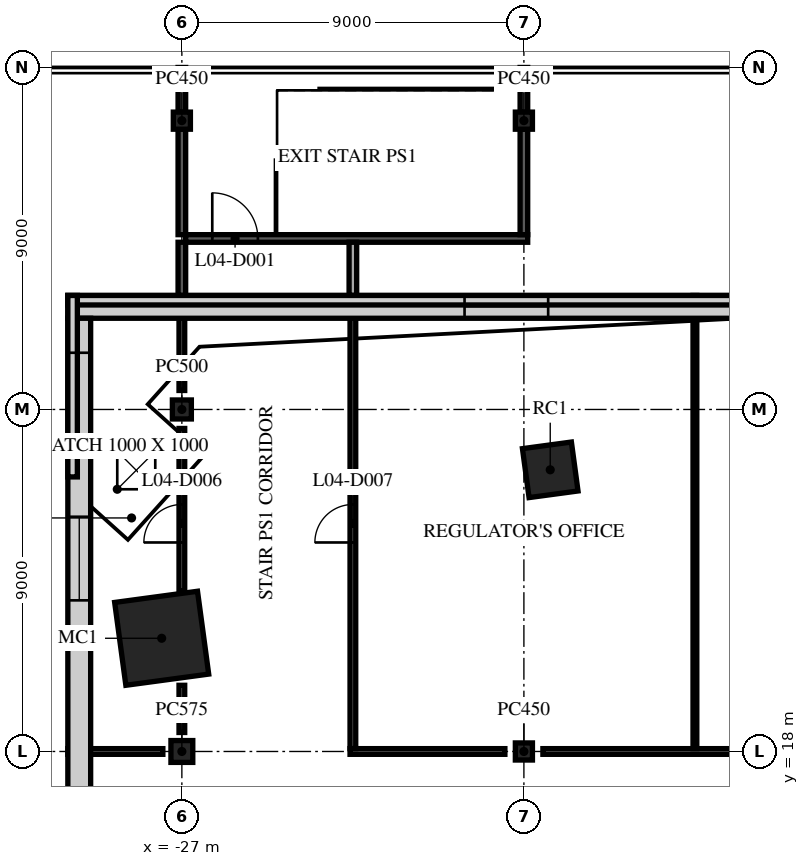
"""IFC4 building model, lengths in metres.
Left out: names, types, materials, properties, quantities, classifications, styles, units other than length and angle.
Written with IfcOpenShell. Run it as: python <this file> out.ifc"""

import sys

from ifc_helpers import new_model, si_unit, direction, frame, frame_2d, origin, origin_2d, place, context, subcontext, project, spatial, rectangle, extrude, element, fill, save


model = new_model("IFC4")
c1 = context("Model", 3, precision=1e-05, world=origin(), true_north=direction((0.0, 1.0)))
c2 = subcontext(c1, "Body", "Model", "MODEL_VIEW")
j1 = project(units=[si_unit("LENGTHUNIT", "METRE"), si_unit("PLANEANGLEUNIT", "RADIAN")], contexts=[c1])
p1 = place(None, origin())
s1 = spatial("IfcSite", under=j1, at=p1, CompositionType="ELEMENT")
p2 = place(p1, origin())
s2 = spatial("IfcBuilding", under=s1, at=p2, CompositionType="ELEMENT")
p3 = place(p2, frame((0.0, 0.0, 18.0)))
s3 = spatial("IfcBuildingStorey", under=s2, at=p3, CompositionType="ELEMENT", Elevation=18.0)
p4 = place(p3, frame((-27.0, 18.0, 0.0), z_axis=(0.0, 0.0, 1.0), x_axis=(1.0, 0.0, 0.0)))
e1 = element("IfcColumn", 1, at=p4, inside=s3, PredefinedType="COLUMN", context=c2, shape_type="SweptSolid", body=[
    extrude(rectangle(XDim=0.575, YDim=0.575, at=origin_2d()), origin(), (0.0, 0.0, 1.0), 4.5),
])
p5 = place(p3, frame((-27.0, 27.0, 0.0), z_axis=(0.0, 0.0, 1.0), x_axis=(1.0, 0.0, 0.0)))
e2 = element("IfcColumn", 2, at=p5, inside=s3, PredefinedType="COLUMN", context=c2, shape_type="SweptSolid", body=[
    extrude(rectangle(XDim=0.5, YDim=0.5, at=origin_2d()), origin(), (0.0, 0.0, 1.0), 4.5),
])
for number, where, z_axis, x_axis in (
    (3, (-27.0, 34.6, 0.0), (0.0, 0.0, 1.0), (1.0, 0.0, 0.0)),
    (4, (-18.0, 18.0, 0.0), (0.0, 0.0, 1.0), (1.0, 0.0, 0.0)),
    (5, (-18.0, 34.6, 0.0), (0.0, 0.0, 1.0), (1.0, 0.0, 0.0)),
):
    element("IfcColumn", number, at=place(p3, frame(where, z_axis=z_axis, x_axis=x_axis)), inside=s3, PredefinedType="COLUMN", context=c2, shape_type="SweptSolid", body=[
        extrude(rectangle(XDim=0.45, YDim=0.45, at=origin_2d()), origin(), (0.0, 0.0, 1.0), 4.5),
    ])
p6 = place(p3, frame((-17.307, 25.412, 0.0), z_axis=(0.0, 0.0, 1.0), x_axis=(0.991001197216, 0.133853005627, 0.0)))
e6 = element("IfcColumn", 6, at=p6, inside=s3, PredefinedType="COLUMN", context=c2, shape_type="SweptSolid", body=[
    extrude(rectangle(XDim=1.3, YDim=1.3, at=origin_2d()), origin(), (0.0, 0.0, 1.0), 4.5),
])
p7 = place(p3, frame((-27.531, 20.979, 0.0), z_axis=(0.0, 0.0, 1.0), x_axis=(0.991001197216, 0.133853005627, 0.0)))
e7 = element("IfcColumn", 7, at=p7, inside=s3, PredefinedType="COLUMN", context=c2, shape_type="SweptSolid", body=[
    extrude(rectangle(XDim=2.2, YDim=2.2, at=origin_2d()), origin(), (0.0, 0.0, 1.0), 4.5),
])
p8 = place(p3, frame((-30.0, 18.0, 0.0), z_axis=(0.0, 0.0, 1.0), x_axis=(1.0, 0.0, 0.0)))
e8 = element("IfcWall", 8, at=p8, inside=s3, PredefinedType="PARTITIONING", context=c2, shape_type="SweptSolid", body=[
    extrude(rectangle(XDim=2.5, YDim=0.15, at=frame_2d((1.25, 0.0))), origin(), (0.0, 0.0, 1.0), 3.23),
])
p9 = place(p3, frame((-22.575, 18.0, 0.0), z_axis=(0.0, 0.0, 1.0), x_axis=(1.0, 0.0, 0.0)))
e9 = element("IfcWall", 9, at=p9, inside=s3, PredefinedType="PARTITIONING", context=c2, shape_type="SweptSolid", body=[
    extrude(rectangle(XDim=4.075, YDim=0.15, at=frame_2d((2.038, 0.0))), origin(), (0.0, 0.0, 1.0), 3.53),
])
p10 = place(p3, frame((-17.5, 18.0, 0.0), z_axis=(0.0, 0.0, 1.0), x_axis=(1.0, 0.0, 0.0)))
e10 = element("IfcWall", 10, at=p10, inside=s3, PredefinedType="PARTITIONING", context=c2, shape_type="SweptSolid", body=[
    extrude(rectangle(XDim=8.0, YDim=0.15, at=frame_2d((4.0, 0.0))), origin(), (0.0, 0.0, 1.0), 3.53),
])
p11 = place(p3, frame((-26.9, 31.5, 0.0), z_axis=(0.0, 0.0, 1.0), x_axis=(1.0, 0.0, 0.0)))
e11 = element("IfcWall", 11, at=p11, inside=s3, PredefinedType="PARTITIONING", context=c2, shape_type="SweptSolid", body=[
    extrude(rectangle(XDim=9.0, YDim=0.2, at=frame_2d((4.5, 0.0))), origin(), (0.0, 0.0, 1.0), 4.05),
])
p12 = place(p11, frame((0.7, 0.0, 0.0)))
e12 = element("IfcOpeningElement", 12, at=p12, cuts=e11, PredefinedType="OPENING", context=c2, shape_type="SweptSolid", body=[
    extrude(rectangle(XDim=1.2, YDim=2.1, at=frame_2d((0.6, 1.05))), frame((0.0, 0.11, 0.0), z_axis=(0.0, -1.0, 0.0), x_axis=(1.0, 0.0, 0.0)), (0.0, 0.0, 1.0), 0.22),
])
p13 = place(p3, frame((-27.0, 18.5, 0.0), z_axis=(0.0, 0.0, 1.0), x_axis=(0.0, 1.0, 0.0)))
e13 = element("IfcWall", 13, at=p13, inside=s3, PredefinedType="PARTITIONING", context=c2, shape_type="SweptSolid", body=[
    extrude(rectangle(XDim=1.242, YDim=0.15, at=frame_2d((0.621, 0.0))), origin(), (0.0, 0.0, 1.0), 4.05),
])
p14 = place(p3, frame((-27.0, 22.216, 0.0), z_axis=(0.0, 0.0, 1.0), x_axis=(0.0, 1.0, 0.0)))
e14 = element("IfcWall", 14, at=p14, inside=s3, PredefinedType="PARTITIONING", context=c2, shape_type="SweptSolid", body=[
    extrude(rectangle(XDim=4.284, YDim=0.15, at=frame_2d((2.142, 0.0))), origin(), (0.0, 0.0, 1.0), 4.05),
])
p15 = place(p14, frame((1.284, 0.0, 0.0)))
e15 = element("IfcOpeningElement", 15, at=p15, cuts=e14, PredefinedType="OPENING", context=c2, shape_type="SweptSolid", body=[
    extrude(rectangle(XDim=1.0, YDim=2.1, at=frame_2d((0.5, 1.05))), frame((0.0, 0.085, 0.0), z_axis=(0.0, -1.0, 0.0), x_axis=(1.0, 0.0, 0.0)), (0.0, 0.0, 1.0), 0.17),
])
p16 = place(p3, frame((-27.0, 27.5, 0.0), z_axis=(0.0, 0.0, 1.0), x_axis=(0.0, 1.0, 0.0)))
e16 = element("IfcWall", 16, at=p16, inside=s3, PredefinedType="PARTITIONING", context=c2, shape_type="SweptSolid", body=[
    extrude(rectangle(XDim=2.5, YDim=0.15, at=frame_2d((1.25, 0.0))), origin(), (0.0, 0.0, 1.0), 4.05),
])
p17 = place(p3, frame((-27.0, 30.0, 0.0), z_axis=(0.0, 0.0, 1.0), x_axis=(0.0, 1.0, 0.0)))
e17 = element("IfcWall", 17, at=p17, inside=s3, PredefinedType="PARTITIONING", context=c2, shape_type="SweptSolid", body=[
    extrude(rectangle(XDim=1.4, YDim=0.2, at=frame_2d((0.7, 0.0))), origin(), (0.0, 0.0, 1.0), 4.05),
])
p18 = place(p3, frame((-27.0, 31.6, 0.0), z_axis=(0.0, 0.0, 1.0), x_axis=(0.0, 1.0, 0.0)))
e18 = element("IfcWall", 18, at=p18, inside=s3, PredefinedType="PARTITIONING", context=c2, shape_type="SweptSolid", body=[
    extrude(rectangle(XDim=2.775, YDim=0.2, at=frame_2d((1.387, 0.0))), origin(), (0.0, 0.0, 1.0), 4.05),
])
p19 = place(p3, frame((-27.0, 34.825, 0.0), z_axis=(0.0, 0.0, 1.0), x_axis=(0.0, 1.0, 0.0)))
e19 = element("IfcWall", 19, at=p19, inside=s3, PredefinedType="PARTITIONING", context=c2, shape_type="SweptSolid", body=[
    extrude(rectangle(XDim=1.175, YDim=0.2, at=frame_2d((0.587, 0.0))), origin(), (0.0, 0.0, 1.0), 4.05),
])
p20 = place(p3, frame((-22.5, 18.075, 0.0), z_axis=(0.0, 0.0, 1.0), x_axis=(0.0, 1.0, 0.0)))
e20 = element("IfcWall", 20, at=p20, inside=s3, PredefinedType="PARTITIONING", context=c2, shape_type="SweptSolid", body=[
    extrude(rectangle(XDim=11.925, YDim=0.15, at=frame_2d((5.962, 0.0))), origin(), (0.0, 0.0, 1.0), 3.23),
])
p21 = place(p20, frame((5.425, 0.0, 0.0)))
e21 = element("IfcOpeningElement", 21, at=p21, cuts=e20, PredefinedType="OPENING", context=c2, shape_type="SweptSolid", body=[
    extrude(rectangle(XDim=1.0, YDim=2.1, at=frame_2d((0.5, 1.05))), frame((0.0, 0.085, 0.0), z_axis=(0.0, -1.0, 0.0), x_axis=(1.0, 0.0, 0.0)), (0.0, 0.0, 1.0), 0.17),
])
p22 = place(p3, frame((-22.5, 30.0, 0.0), z_axis=(0.0, 0.0, 1.0), x_axis=(0.0, 1.0, 0.0)))
e22 = element("IfcWall", 22, at=p22, inside=s3, PredefinedType="PARTITIONING", context=c2, shape_type="SweptSolid", body=[
    extrude(rectangle(XDim=1.4, YDim=0.2, at=frame_2d((0.7, 0.0))), origin(), (0.0, 0.0, 1.0), 4.05),
])
p23 = place(p3, frame((-18.0, 31.6, 0.0), z_axis=(0.0, 0.0, 1.0), x_axis=(0.0, 1.0, 0.0)))
e23 = element("IfcWall", 23, at=p23, inside=s3, PredefinedType="PARTITIONING", context=c2, shape_type="SweptSolid", body=[
    extrude(rectangle(XDim=2.775, YDim=0.2, at=frame_2d((1.387, 0.0))), origin(), (0.0, 0.0, 1.0), 4.05),
])
p24 = place(p3, frame((-18.0, 34.825, 0.0), z_axis=(0.0, 0.0, 1.0), x_axis=(0.0, 1.0, 0.0)))
e24 = element("IfcWall", 24, at=p24, inside=s3, PredefinedType="PARTITIONING", context=c2, shape_type="SweptSolid", body=[
    extrude(rectangle(XDim=1.175, YDim=0.2, at=frame_2d((0.587, 0.0))), origin(), (0.0, 0.0, 1.0), 4.05),
])
p25 = place(p3, frame((-13.5, 18.075, 0.0), z_axis=(0.0, 0.0, 1.0), x_axis=(0.0, 1.0, 0.0)))
e25 = element("IfcWall", 25, at=p25, inside=s3, PredefinedType="PARTITIONING", context=c2, shape_type="SweptSolid", body=[
    extrude(rectangle(XDim=11.925, YDim=0.1, at=frame_2d((5.962, 0.0))), origin(), (0.0, 0.0, 1.0), 3.23),
])
p26 = place(p3, frame((-7.4, 29.7, 0.0), z_axis=(0.0, 0.0, 1.0), x_axis=(-1.0, 0.0, 0.0)))
e26 = element("IfcWall", 26, at=p26, inside=s3, PredefinedType="STANDARD", context=c2, shape_type="SweptSolid", body=[
    extrude(rectangle(XDim=22.6, YDim=0.6, at=frame_2d((11.3, 0.0))), origin(), (0.0, 0.0, 1.0), 4.05),
])
p27 = place(p26, frame((0.731, 0.0, 0.9)))
e27 = element("IfcOpeningElement", 27, at=p27, cuts=e26, PredefinedType="OPENING", context=c2, shape_type="SweptSolid", body=[
    extrude(rectangle(XDim=2.2, YDim=3.0, at=frame_2d((1.1, 1.5))), frame((0.0, 0.31, 0.0), z_axis=(0.0, -1.0, 0.0), x_axis=(1.0, 0.0, 0.0)), (0.0, 0.0, 1.0), 0.62),
])
p28 = place(p26, frame((9.961, 0.0, 0.9)))
e28 = element("IfcOpeningElement", 28, at=p28, cuts=e26, PredefinedType="OPENING", context=c2, shape_type="SweptSolid", body=[
    extrude(rectangle(XDim=2.2, YDim=3.0, at=frame_2d((1.1, 1.5))), frame((0.0, 0.31, 0.0), z_axis=(0.0, -1.0, 0.0), x_axis=(1.0, 0.0, 0.0)), (0.0, 0.0, 1.0), 0.62),
])
p29 = place(p3, frame((-29.7, 29.4, 0.0), z_axis=(0.0, 0.0, 1.0), x_axis=(0.0, -1.0, 0.0)))
e29 = element("IfcWall", 29, at=p29, inside=s3, PredefinedType="STANDARD", context=c2, shape_type="SweptSolid", body=[
    extrude(rectangle(XDim=28.0, YDim=0.6, at=frame_2d((14.0, 0.0))), origin(), (0.0, 0.0, 1.0), 4.05),
])
p30 = place(p29, frame((0.908, 0.0, 0.9)))
e30 = element("IfcOpeningElement", 30, at=p30, cuts=e29, PredefinedType="OPENING", context=c2, shape_type="SweptSolid", body=[
    extrude(rectangle(XDim=2.2, YDim=3.0, at=frame_2d((1.1, 1.5))), frame((0.0, 0.31, 0.0), z_axis=(0.0, -1.0, 0.0), x_axis=(1.0, 0.0, 0.0)), (0.0, 0.0, 1.0), 0.62),
])
p31 = place(p29, frame((5.223, 0.0, 0.9)))
e31 = element("IfcOpeningElement", 31, at=p31, cuts=e29, PredefinedType="OPENING", context=c2, shape_type="SweptSolid", body=[
    extrude(rectangle(XDim=2.2, YDim=3.0, at=frame_2d((1.1, 1.5))), frame((0.0, 0.31, 0.0), z_axis=(0.0, -1.0, 0.0), x_axis=(1.0, 0.0, 0.0)), (0.0, 0.0, 1.0), 0.62),
])
p32 = place(p3, frame((-7.453, 29.875, 4.5), z_axis=(0.0, 0.0, 1.0), x_axis=(-1.0, 0.0, 0.0)))
e32 = element("IfcWall", 32, at=p32, inside=s3, PredefinedType="PARAPET", context=c2, shape_type="SweptSolid", body=[
    extrude(rectangle(XDim=22.547, YDim=0.25, at=frame_2d((11.273, 0.0))), origin(), (0.0, 0.0, 1.0), 1.1),
])
p33 = place(p3, frame((-29.875, 30.0, 4.5), z_axis=(0.0, 0.0, 1.0), x_axis=(0.0, -1.0, 0.0)))
e33 = element("IfcWall", 33, at=p33, inside=s3, PredefinedType="PARAPET", context=c2, shape_type="SweptSolid", body=[
    extrude(rectangle(XDim=4.775, YDim=0.25, at=frame_2d((2.387, 0.0))), origin(), (0.0, 0.0, 1.0), 1.1),
])
p34 = place(p12, origin())
e34 = element("IfcDoor", 34, at=p34, inside=s3, OperationType="SINGLE_SWING_LEFT", PredefinedType="DOOR", context=c2, shape_type="SweptSolid", body=[
    extrude(rectangle(XDim=1.2, YDim=2.1, at=frame_2d((0.6, 1.05))), frame((0.0, 0.025, 0.0), z_axis=(0.0, -1.0, 0.0), x_axis=(1.0, 0.0, 0.0)), (0.0, 0.0, 1.0), 0.05),
])
fill(e12, e34)
p35 = place(p15, origin())
e35 = element("IfcDoor", 35, at=p35, inside=s3, OperationType="SINGLE_SWING_RIGHT", PredefinedType="DOOR", context=c2, shape_type="SweptSolid", body=[
    extrude(rectangle(XDim=1.0, YDim=2.1, at=frame_2d((0.5, 1.05))), frame((0.0, 0.025, 0.0), z_axis=(0.0, -1.0, 0.0), x_axis=(1.0, 0.0, 0.0)), (0.0, 0.0, 1.0), 0.05),
])
fill(e15, e35)
p36 = place(p21, origin())
e36 = element("IfcDoor", 36, at=p36, inside=s3, OperationType="SINGLE_SWING_LEFT", PredefinedType="DOOR", context=c2, shape_type="SweptSolid", body=[
    extrude(rectangle(XDim=1.0, YDim=2.1, at=frame_2d((0.5, 1.05))), frame((0.0, 0.025, 0.0), z_axis=(0.0, -1.0, 0.0), x_axis=(1.0, 0.0, 0.0)), (0.0, 0.0, 1.0), 0.05),
])
fill(e21, e36)
p37 = place(p28, origin())
e37 = element("IfcWindow", 37, at=p37, inside=s3, PartitioningType="SINGLE_PANEL", PredefinedType="WINDOW", context=c2, shape_type="SweptSolid", body=[
    extrude(rectangle(XDim=2.2, YDim=3.0, at=frame_2d((1.1, 1.5))), frame((0.0, 0.03, 0.0), z_axis=(0.0, -1.0, 0.0), x_axis=(1.0, 0.0, 0.0)), (0.0, 0.0, 1.0), 0.06),
])
fill(e28, e37)
p38 = place(p30, origin())
e38 = element("IfcWindow", 38, at=p38, inside=s3, PartitioningType="SINGLE_PANEL", PredefinedType="WINDOW", context=c2, shape_type="SweptSolid", body=[
    extrude(rectangle(XDim=2.2, YDim=3.0, at=frame_2d((1.1, 1.5))), frame((0.0, 0.03, 0.0), z_axis=(0.0, -1.0, 0.0), x_axis=(1.0, 0.0, 0.0)), (0.0, 0.0, 1.0), 0.06),
])
fill(e30, e38)
p39 = place(p31, origin())
e39 = element("IfcWindow", 39, at=p39, inside=s3, PartitioningType="SINGLE_PANEL", PredefinedType="WINDOW", context=c2, shape_type="SweptSolid", body=[
    extrude(rectangle(XDim=2.2, YDim=3.0, at=frame_2d((1.1, 1.5))), frame((0.0, 0.03, 0.0), z_axis=(0.0, -1.0, 0.0), x_axis=(1.0, 0.0, 0.0)), (0.0, 0.0, 1.0), 0.06),
])
fill(e31, e39)
p40 = place(p3, frame((0.0, 0.0, 4.05)))
p41 = place(p40, frame((-28.2, 25.4, 0.0)))
p42 = place(p41, frame((0.0, 0.0, 0.45)))
e40 = element("IfcDoor", 40, at=p42, inside=s3, OperationType="SINGLE_SWING_LEFT", PredefinedType="TRAPDOOR", context=c2, shape_type="SweptSolid", body=[
    extrude(rectangle(XDim=1.0, YDim=1.0, at=origin_2d()), origin(), (0.0, 0.0, 1.0), 0.05),
])
save(model, sys.argv[1])
